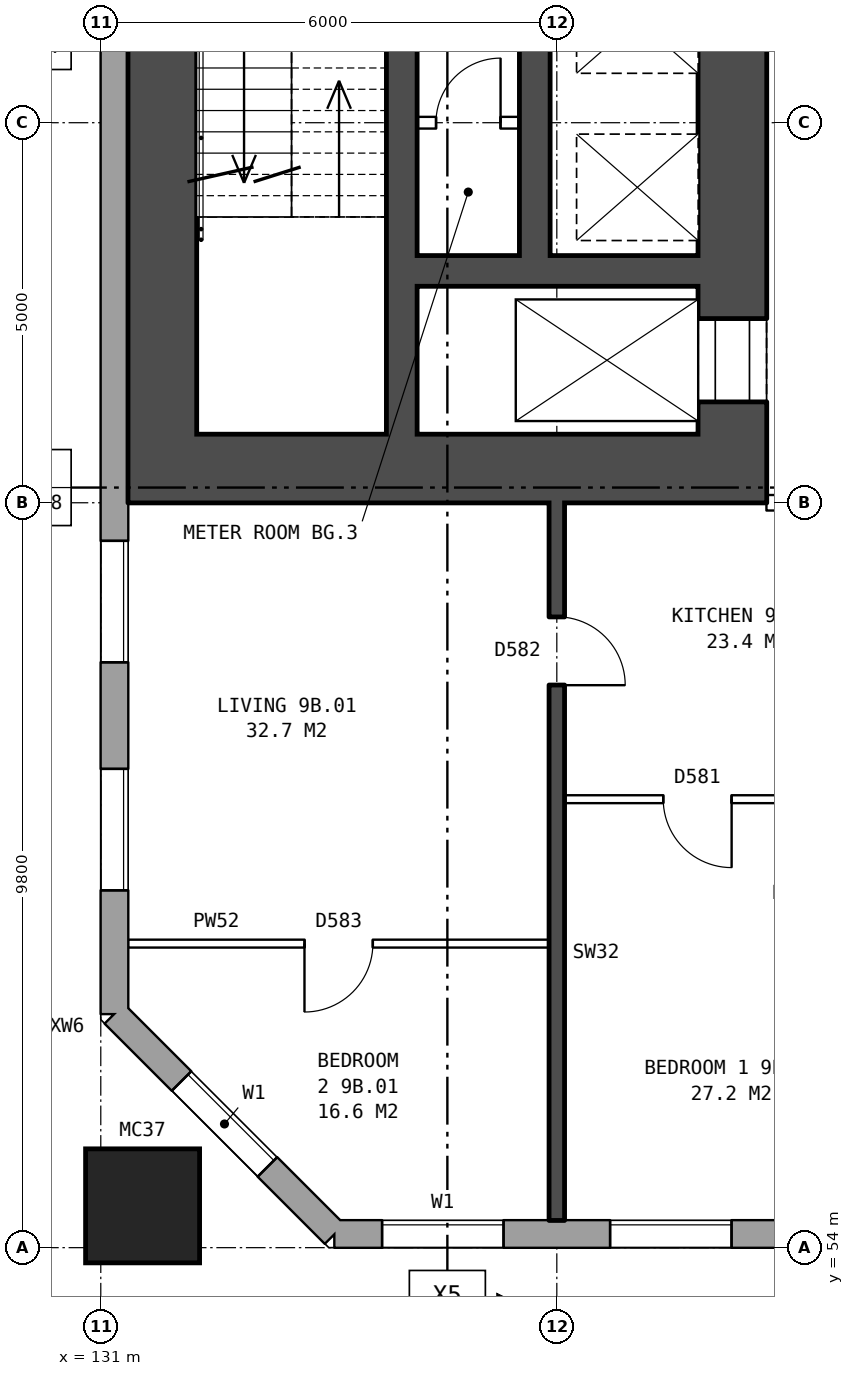
"""IFC4 building model, lengths in metres.
Left out: names, types, materials, properties, quantities, classifications, styles, units other than length and angle.
Written with IfcOpenShell. Run it as: python <this file> out.ifc"""

import sys

from ifc_helpers import new_model, si_unit, direction, frame, frame_2d, origin, origin_2d, place, context, subcontext, project, spatial, rectangle, hollow_rectangle, extrude, element, fill, save


model = new_model("IFC4")
c1 = context("Model", 3, precision=1e-05, world=origin(), true_north=direction((0.0, 1.0)))
c2 = subcontext(c1, "Body", "Model", "MODEL_VIEW")
j1 = project(units=[si_unit("LENGTHUNIT", "METRE"), si_unit("PLANEANGLEUNIT", "RADIAN")], contexts=[c1])
p1 = place(None, origin())
s1 = spatial("IfcSite", under=j1, at=p1, CompositionType="ELEMENT")
p2 = place(p1, origin())
s2 = spatial("IfcBuilding", under=s1, at=p2, CompositionType="ELEMENT")
p3 = place(p2, frame((0.0, 0.0, 35.0)))
s3 = spatial("IfcBuildingStorey", under=s2, at=p3, CompositionType="ELEMENT", Elevation=35.0)
p4 = place(p3, frame((131.55, 54.55, 0.0), z_axis=(0.0, 0.0, 1.0), x_axis=(1.0, 0.0, 0.0)))
e1 = element("IfcColumn", 1, at=p4, inside=s3, PredefinedType="COLUMN", context=c2, shape_type="SweptSolid", body=[
    extrude(hollow_rectangle(XDim=1.5, YDim=1.5, WallThickness=0.08, at=origin_2d()), origin(), (0.0, 0.0, 1.0), 3.1),
])
p5 = place(p3, frame((131.18, 57.075, 0.0), z_axis=(0.0, 0.0, 1.0), x_axis=(0.707106781187, -0.707106781187, 0.0)))
e2 = element("IfcWall", 2, at=p5, inside=s3, PredefinedType="STANDARD", context=c2, shape_type="SweptSolid", body=[
    extrude(rectangle(XDim=4.094, YDim=0.36, at=frame_2d((2.047, 0.0))), origin(), (0.0, 0.0, 1.0), 2.85),
])
p6 = place(p5, frame((1.247, 0.0, 0.8)))
e3 = element("IfcOpeningElement", 3, at=p6, cuts=e2, PredefinedType="OPENING", context=c2, shape_type="SweptSolid", body=[
    extrude(rectangle(XDim=1.6, YDim=1.8, at=frame_2d((0.8, 0.9))), frame((0.0, 0.19, 0.0), z_axis=(0.0, -1.0, 0.0), x_axis=(1.0, 0.0, 0.0)), (0.0, 0.0, 1.0), 0.38),
])
p7 = place(p3, frame((134.075, 54.18, 0.0), z_axis=(0.0, 0.0, 1.0), x_axis=(1.0, 0.0, 0.0)))
e4 = element("IfcWall", 4, at=p7, inside=s3, PredefinedType="STANDARD", context=c2, shape_type="SweptSolid", body=[
    extrude(rectangle(XDim=40.601, YDim=0.36, at=frame_2d((20.3, 0.0))), origin(), (0.0, 0.0, 1.0), 2.85),
])
p8 = place(p7, frame((0.625, 0.0, 0.8)))
e5 = element("IfcOpeningElement", 5, at=p8, cuts=e4, PredefinedType="OPENING", context=c2, shape_type="SweptSolid", body=[
    extrude(rectangle(XDim=1.6, YDim=1.8, at=frame_2d((0.8, 0.9))), frame((0.0, 0.19, 0.0), z_axis=(0.0, -1.0, 0.0), x_axis=(1.0, 0.0, 0.0)), (0.0, 0.0, 1.0), 0.38),
])
p9 = place(p7, frame((3.625, 0.0, 0.8)))
e6 = element("IfcOpeningElement", 6, at=p9, cuts=e4, PredefinedType="OPENING", context=c2, shape_type="SweptSolid", body=[
    extrude(rectangle(XDim=1.6, YDim=1.8, at=frame_2d((0.8, 0.9))), frame((0.0, 0.19, 0.0), z_axis=(0.0, -1.0, 0.0), x_axis=(1.0, 0.0, 0.0)), (0.0, 0.0, 1.0), 0.38),
])
p10 = place(p7, frame((6.625, 0.0, 0.8)))
e7 = element("IfcOpeningElement", 7, at=p10, cuts=e4, PredefinedType="OPENING", context=c2, shape_type="SweptSolid", body=[
    extrude(rectangle(XDim=1.6, YDim=1.8, at=frame_2d((0.8, 0.9))), frame((0.0, 0.19, 0.0), z_axis=(0.0, -1.0, 0.0), x_axis=(1.0, 0.0, 0.0)), (0.0, 0.0, 1.0), 0.38),
])
p11 = place(p7, frame((9.625, 0.0, 0.8)))
e8 = element("IfcOpeningElement", 8, at=p11, cuts=e4, PredefinedType="OPENING", context=c2, shape_type="SweptSolid", body=[
    extrude(rectangle(XDim=1.6, YDim=1.8, at=frame_2d((0.8, 0.9))), frame((0.0, 0.19, 0.0), z_axis=(0.0, -1.0, 0.0), x_axis=(1.0, 0.0, 0.0)), (0.0, 0.0, 1.0), 0.38),
])
p12 = place(p7, frame((12.625, 0.0, 0.8)))
e9 = element("IfcOpeningElement", 9, at=p12, cuts=e4, PredefinedType="OPENING", context=c2, shape_type="SweptSolid", body=[
    extrude(rectangle(XDim=1.6, YDim=1.8, at=frame_2d((0.8, 0.9))), frame((0.0, 0.19, 0.0), z_axis=(0.0, -1.0, 0.0), x_axis=(1.0, 0.0, 0.0)), (0.0, 0.0, 1.0), 0.38),
])
p13 = place(p7, frame((15.625, 0.0, 0.8)))
e10 = element("IfcOpeningElement", 10, at=p13, cuts=e4, PredefinedType="OPENING", context=c2, shape_type="SweptSolid", body=[
    extrude(rectangle(XDim=1.6, YDim=1.8, at=frame_2d((0.8, 0.9))), frame((0.0, 0.19, 0.0), z_axis=(0.0, -1.0, 0.0), x_axis=(1.0, 0.0, 0.0)), (0.0, 0.0, 1.0), 0.38),
])
p14 = place(p7, frame((18.875, 0.0, 0.15)))
e11 = element("IfcOpeningElement", 11, at=p14, cuts=e4, PredefinedType="OPENING", context=c2, shape_type="SweptSolid", body=[
    extrude(rectangle(XDim=0.8, YDim=0.9, at=frame_2d((0.4, 0.45))), frame((0.0, 0.19, 0.0), z_axis=(0.0, -1.0, 0.0), x_axis=(1.0, 0.0, 0.0)), (0.0, 0.0, 1.0), 0.38),
])
p15 = place(p7, frame((22.175, 0.0, 1.7)))
e12 = element("IfcOpeningElement", 12, at=p15, cuts=e4, PredefinedType="OPENING", context=c2, shape_type="SweptSolid", body=[
    extrude(rectangle(XDim=0.8, YDim=0.9, at=frame_2d((0.4, 0.45))), frame((0.0, 0.19, 0.0), z_axis=(0.0, -1.0, 0.0), x_axis=(1.0, 0.0, 0.0)), (0.0, 0.0, 1.0), 0.38),
])
p16 = place(p7, frame((24.625, 0.0, 0.8)))
e13 = element("IfcOpeningElement", 13, at=p16, cuts=e4, PredefinedType="OPENING", context=c2, shape_type="SweptSolid", body=[
    extrude(rectangle(XDim=1.6, YDim=1.8, at=frame_2d((0.8, 0.9))), frame((0.0, 0.19, 0.0), z_axis=(0.0, -1.0, 0.0), x_axis=(1.0, 0.0, 0.0)), (0.0, 0.0, 1.0), 0.38),
])
p17 = place(p7, frame((27.625, 0.0, 0.8)))
e14 = element("IfcOpeningElement", 14, at=p17, cuts=e4, PredefinedType="OPENING", context=c2, shape_type="SweptSolid", body=[
    extrude(rectangle(XDim=1.6, YDim=1.8, at=frame_2d((0.8, 0.9))), frame((0.0, 0.19, 0.0), z_axis=(0.0, -1.0, 0.0), x_axis=(1.0, 0.0, 0.0)), (0.0, 0.0, 1.0), 0.38),
])
p18 = place(p7, frame((30.625, 0.0, 0.8)))
e15 = element("IfcOpeningElement", 15, at=p18, cuts=e4, PredefinedType="OPENING", context=c2, shape_type="SweptSolid", body=[
    extrude(rectangle(XDim=1.6, YDim=1.8, at=frame_2d((0.8, 0.9))), frame((0.0, 0.19, 0.0), z_axis=(0.0, -1.0, 0.0), x_axis=(1.0, 0.0, 0.0)), (0.0, 0.0, 1.0), 0.38),
])
p19 = place(p7, frame((33.625, 0.0, 0.8)))
e16 = element("IfcOpeningElement", 16, at=p19, cuts=e4, PredefinedType="OPENING", context=c2, shape_type="SweptSolid", body=[
    extrude(rectangle(XDim=1.6, YDim=1.8, at=frame_2d((0.8, 0.9))), frame((0.0, 0.19, 0.0), z_axis=(0.0, -1.0, 0.0), x_axis=(1.0, 0.0, 0.0)), (0.0, 0.0, 1.0), 0.38),
])
p20 = place(p7, frame((36.625, 0.0, 0.8)))
e17 = element("IfcOpeningElement", 17, at=p20, cuts=e4, PredefinedType="OPENING", context=c2, shape_type="SweptSolid", body=[
    extrude(rectangle(XDim=1.6, YDim=1.8, at=frame_2d((0.8, 0.9))), frame((0.0, 0.19, 0.0), z_axis=(0.0, -1.0, 0.0), x_axis=(1.0, 0.0, 0.0)), (0.0, 0.0, 1.0), 0.38),
])
p21 = place(p7, frame((19.975, 0.0, 0.15)))
e18 = element("IfcOpeningElement", 18, at=p21, cuts=e4, PredefinedType="OPENING", context=c2, shape_type="SweptSolid", body=[
    extrude(rectangle(XDim=0.6, YDim=1.8, at=frame_2d((0.3, 0.9))), frame((0.0, 0.19, 0.0), z_axis=(0.0, -1.0, 0.0), x_axis=(1.0, 0.0, 0.0)), (0.0, 0.0, 1.0), 0.38),
])
p22 = place(p7, frame((23.325, 0.0, 0.8)))
e19 = element("IfcOpeningElement", 19, at=p22, cuts=e4, PredefinedType="OPENING", context=c2, shape_type="SweptSolid", body=[
    extrude(rectangle(XDim=1.0, YDim=1.8, at=frame_2d((0.5, 0.9))), frame((0.0, 0.19, 0.0), z_axis=(0.0, -1.0, 0.0), x_axis=(1.0, 0.0, 0.0)), (0.0, 0.0, 1.0), 0.38),
])
p23 = place(p3, frame((131.18, 82.925, 0.0), z_axis=(0.0, 0.0, 1.0), x_axis=(0.0, -1.0, 0.0)))
e20 = element("IfcWall", 20, at=p23, inside=s3, PredefinedType="STANDARD", context=c2, shape_type="SweptSolid", body=[
    extrude(rectangle(XDim=25.851, YDim=0.36, at=frame_2d((12.925, 0.0))), origin(), (0.0, 0.0, 1.0), 2.85),
])
p24 = place(p23, frame((1.625, 0.0, 0.8)))
e21 = element("IfcOpeningElement", 21, at=p24, cuts=e20, PredefinedType="OPENING", context=c2, shape_type="SweptSolid", body=[
    extrude(rectangle(XDim=1.6, YDim=1.8, at=frame_2d((0.8, 0.9))), frame((0.0, 0.19, 0.0), z_axis=(0.0, -1.0, 0.0), x_axis=(1.0, 0.0, 0.0)), (0.0, 0.0, 1.0), 0.38),
])
p25 = place(p23, frame((4.625, 0.0, 0.8)))
e22 = element("IfcOpeningElement", 22, at=p25, cuts=e20, PredefinedType="OPENING", context=c2, shape_type="SweptSolid", body=[
    extrude(rectangle(XDim=1.6, YDim=1.8, at=frame_2d((0.8, 0.9))), frame((0.0, 0.19, 0.0), z_axis=(0.0, -1.0, 0.0), x_axis=(1.0, 0.0, 0.0)), (0.0, 0.0, 1.0), 0.38),
])
p26 = place(p23, frame((19.625, 0.0, 0.8)))
e23 = element("IfcOpeningElement", 23, at=p26, cuts=e20, PredefinedType="OPENING", context=c2, shape_type="SweptSolid", body=[
    extrude(rectangle(XDim=1.6, YDim=1.8, at=frame_2d((0.8, 0.9))), frame((0.0, 0.19, 0.0), z_axis=(0.0, -1.0, 0.0), x_axis=(1.0, 0.0, 0.0)), (0.0, 0.0, 1.0), 0.38),
])
p27 = place(p23, frame((22.625, 0.0, 0.8)))
e24 = element("IfcOpeningElement", 24, at=p27, cuts=e20, PredefinedType="OPENING", context=c2, shape_type="SweptSolid", body=[
    extrude(rectangle(XDim=1.6, YDim=1.8, at=frame_2d((0.8, 0.9))), frame((0.0, 0.19, 0.0), z_axis=(0.0, -1.0, 0.0), x_axis=(1.0, 0.0, 0.0)), (0.0, 0.0, 1.0), 0.38),
])
p28 = place(p3, frame((139.31, 64.7, 0.0), z_axis=(0.0, 0.0, 1.0), x_axis=(0.0, 1.0, 0.0)))
e25 = element("IfcWall", 25, at=p28, inside=s3, PredefinedType="SHEAR", context=c2, shape_type="SweptSolid", body=[
    extrude(rectangle(XDim=10.6, YDim=0.9, at=frame_2d((5.3, 0.0))), origin(), (0.0, 0.0, 1.0), 2.85),
])
p29 = place(p28, frame((0.425, 0.0, 0.0)))
e26 = element("IfcOpeningElement", 26, at=p29, cuts=e25, PredefinedType="OPENING", context=c2, shape_type="SweptSolid", body=[
    extrude(rectangle(XDim=1.1, YDim=2.1, at=frame_2d((0.55, 1.05))), frame((0.0, 0.46, 0.0), z_axis=(0.0, -1.0, 0.0), x_axis=(1.0, 0.0, 0.0)), (0.0, 0.0, 1.0), 0.92),
])
p30 = place(p28, frame((9.0, 0.0, 0.0)))
e27 = element("IfcOpeningElement", 27, at=p30, cuts=e25, PredefinedType="OPENING", context=c2, shape_type="SweptSolid", body=[
    extrude(rectangle(XDim=1.1, YDim=2.1, at=frame_2d((0.55, 1.05))), frame((0.0, 0.46, 0.0), z_axis=(0.0, -1.0, 0.0), x_axis=(1.0, 0.0, 0.0)), (0.0, 0.0, 1.0), 0.92),
])
p31 = place(p28, frame((7.225, 0.0, 0.0)))
e28 = element("IfcOpeningElement", 28, at=p31, cuts=e25, PredefinedType="OPENING", context=c2, shape_type="SweptSolid", body=[
    extrude(rectangle(XDim=0.85, YDim=2.1, at=frame_2d((0.425, 1.05))), frame((0.0, 0.46, 0.0), z_axis=(0.0, -1.0, 0.0), x_axis=(1.0, 0.0, 0.0)), (0.0, 0.0, 1.0), 0.92),
])
p32 = place(p3, frame((131.81, 64.7, 0.0), z_axis=(0.0, 0.0, 1.0), x_axis=(0.0, 1.0, 0.0)))
e29 = element("IfcWall", 29, at=p32, inside=s3, PredefinedType="SHEAR", context=c2, shape_type="SweptSolid", body=[
    extrude(rectangle(XDim=10.6, YDim=0.9, at=frame_2d((5.3, 0.0))), origin(), (0.0, 0.0, 1.0), 2.85),
])
p33 = place(p3, frame((139.76, 64.25, 0.0), z_axis=(0.0, 0.0, 1.0), x_axis=(-1.0, 0.0, 0.0)))
e30 = element("IfcWall", 30, at=p33, inside=s3, PredefinedType="SHEAR", context=c2, shape_type="SweptSolid", body=[
    extrude(rectangle(XDim=8.4, YDim=0.9, at=frame_2d((4.2, 0.0))), origin(), (0.0, 0.0, 1.0), 2.85),
])
p34 = place(p3, frame((138.86, 66.85, 0.0), z_axis=(0.0, 0.0, 1.0), x_axis=(-1.0, 0.0, 0.0)))
e31 = element("IfcWall", 31, at=p34, inside=s3, PredefinedType="SHEAR", context=c2, shape_type="SweptSolid", body=[
    extrude(rectangle(XDim=3.7, YDim=0.4, at=frame_2d((1.85, 0.0))), origin(), (0.0, 0.0, 1.0), 2.85),
])
p35 = place(p3, frame((136.51, 68.8, 0.0), z_axis=(0.0, 0.0, 1.0), x_axis=(-1.0, 0.0, 0.0)))
e32 = element("IfcWall", 32, at=p35, inside=s3, PredefinedType="PARTITIONING", context=c2, shape_type="SweptSolid", body=[
    extrude(rectangle(XDim=1.35, YDim=0.15, at=frame_2d((0.675, 0.0))), origin(), (0.0, 0.0, 1.0), 2.85),
])
p36 = place(p35, frame((0.25, 0.0, 0.0)))
e33 = element("IfcOpeningElement", 33, at=p36, cuts=e32, PredefinedType="OPENING", context=c2, shape_type="SweptSolid", body=[
    extrude(rectangle(XDim=0.85, YDim=2.1, at=frame_2d((0.425, 1.05))), frame((0.0, 0.085, 0.0), z_axis=(0.0, -1.0, 0.0), x_axis=(1.0, 0.0, 0.0)), (0.0, 0.0, 1.0), 0.17),
])
p37 = place(p3, frame((136.71, 67.05, 0.0), z_axis=(0.0, 0.0, 1.0), x_axis=(0.0, 1.0, 0.0)))
e34 = element("IfcWall", 34, at=p37, inside=s3, PredefinedType="SHEAR", context=c2, shape_type="SweptSolid", body=[
    extrude(rectangle(XDim=4.0, YDim=0.4, at=frame_2d((2.0, 0.0))), origin(), (0.0, 0.0, 1.0), 2.85),
])
p38 = place(p3, frame((134.96, 64.7, 0.0), z_axis=(0.0, 0.0, 1.0), x_axis=(0.0, 1.0, 0.0)))
e35 = element("IfcWall", 35, at=p38, inside=s3, PredefinedType="SHEAR", context=c2, shape_type="SweptSolid", body=[
    extrude(rectangle(XDim=6.35, YDim=0.4, at=frame_2d((3.175, 0.0))), origin(), (0.0, 0.0, 1.0), 2.85),
])
p39 = place(p3, frame((131.36, 58.0, 0.0), z_axis=(0.0, 0.0, 1.0), x_axis=(1.0, 0.0, 0.0)))
e36 = element("IfcWall", 36, at=p39, inside=s3, PredefinedType="PARTITIONING", context=c2, shape_type="SweptSolid", body=[
    extrude(rectangle(XDim=5.54, YDim=0.1, at=frame_2d((2.77, 0.0))), origin(), (0.0, 0.0, 1.0), 2.85),
])
p40 = place(p39, frame((2.32, 0.0, 0.0)))
e37 = element("IfcOpeningElement", 37, at=p40, cuts=e36, PredefinedType="OPENING", context=c2, shape_type="SweptSolid", body=[
    extrude(rectangle(XDim=0.9, YDim=2.1, at=frame_2d((0.45, 1.05))), frame((0.0, 0.06, 0.0), z_axis=(0.0, -1.0, 0.0), x_axis=(1.0, 0.0, 0.0)), (0.0, 0.0, 1.0), 0.12),
])
p41 = place(p3, frame((137.1, 59.9, 0.0), z_axis=(0.0, 0.0, 1.0), x_axis=(1.0, 0.0, 0.0)))
e38 = element("IfcWall", 38, at=p41, inside=s3, PredefinedType="PARTITIONING", context=c2, shape_type="SweptSolid", body=[
    extrude(rectangle(XDim=5.8, YDim=0.1, at=frame_2d((2.9, 0.0))), origin(), (0.0, 0.0, 1.0), 2.85),
])
p42 = place(p41, frame((1.3, 0.0, 0.0)))
e39 = element("IfcOpeningElement", 39, at=p42, cuts=e38, PredefinedType="OPENING", context=c2, shape_type="SweptSolid", body=[
    extrude(rectangle(XDim=0.9, YDim=2.1, at=frame_2d((0.45, 1.05))), frame((0.0, 0.06, 0.0), z_axis=(0.0, -1.0, 0.0), x_axis=(1.0, 0.0, 0.0)), (0.0, 0.0, 1.0), 0.12),
])
p43 = place(p41, frame((4.2, 0.0, 0.0)))
e40 = element("IfcOpeningElement", 40, at=p43, cuts=e38, PredefinedType="OPENING", context=c2, shape_type="SweptSolid", body=[
    extrude(rectangle(XDim=0.9, YDim=2.1, at=frame_2d((0.45, 1.05))), frame((0.0, 0.06, 0.0), z_axis=(0.0, -1.0, 0.0), x_axis=(1.0, 0.0, 0.0)), (0.0, 0.0, 1.0), 0.12),
])
p44 = place(p3, frame((139.76, 63.8, 0.0), z_axis=(0.0, 0.0, 1.0), x_axis=(1.0, 0.0, 0.0)))
e41 = element("IfcWall", 41, at=p44, inside=s3, PredefinedType="PARTITIONING", context=c2, shape_type="SweptSolid", body=[
    extrude(rectangle(XDim=3.0, YDim=0.2, at=frame_2d((1.5, 0.0))), origin(), (0.0, 0.0, 1.0), 2.85),
])
p45 = place(p44, frame((1.0, 0.0, 0.0)))
e42 = element("IfcOpeningElement", 42, at=p45, cuts=e41, PredefinedType="OPENING", context=c2, shape_type="SweptSolid", body=[
    extrude(rectangle(XDim=1.0, YDim=2.1, at=frame_2d((0.5, 1.05))), frame((0.0, 0.11, 0.0), z_axis=(0.0, -1.0, 0.0), x_axis=(1.0, 0.0, 0.0)), (0.0, 0.0, 1.0), 0.22),
])
p46 = place(p3, frame((137.0, 54.36, 0.0), z_axis=(0.0, 0.0, 1.0), x_axis=(0.0, 1.0, 0.0)))
e43 = element("IfcWall", 43, at=p46, inside=s3, PredefinedType="SOLIDWALL", context=c2, shape_type="SweptSolid", body=[
    extrude(rectangle(XDim=9.44, YDim=0.2, at=frame_2d((4.72, 0.0))), origin(), (0.0, 0.0, 1.0), 2.85),
])
p47 = place(p46, frame((7.04, 0.0, 0.0)))
e44 = element("IfcOpeningElement", 44, at=p47, cuts=e43, PredefinedType="OPENING", context=c2, shape_type="SweptSolid", body=[
    extrude(rectangle(XDim=0.9, YDim=2.1, at=frame_2d((0.45, 1.05))), frame((0.0, 0.11, 0.0), z_axis=(0.0, -1.0, 0.0), x_axis=(1.0, 0.0, 0.0)), (0.0, 0.0, 1.0), 0.22),
])
p48 = place(p6, origin())
e45 = element("IfcWindow", 45, at=p48, inside=s3, PartitioningType="SINGLE_PANEL", PredefinedType="WINDOW", context=c2, shape_type="SweptSolid", body=[
    extrude(rectangle(XDim=1.6, YDim=1.8, at=frame_2d((0.8, 0.9))), frame((0.0, 0.15, 0.0), z_axis=(0.0, -1.0, 0.0), x_axis=(1.0, 0.0, 0.0)), (0.0, 0.0, 1.0), 0.06),
])
fill(e3, e45)
p49 = place(p8, origin())
e46 = element("IfcWindow", 46, at=p49, inside=s3, PartitioningType="SINGLE_PANEL", PredefinedType="WINDOW", context=c2, shape_type="SweptSolid", body=[
    extrude(rectangle(XDim=1.6, YDim=1.8, at=frame_2d((0.8, 0.9))), frame((0.0, 0.15, 0.0), z_axis=(0.0, -1.0, 0.0), x_axis=(1.0, 0.0, 0.0)), (0.0, 0.0, 1.0), 0.06),
])
fill(e5, e46)
p50 = place(p9, origin())
e47 = element("IfcWindow", 47, at=p50, inside=s3, PartitioningType="SINGLE_PANEL", PredefinedType="WINDOW", context=c2, shape_type="SweptSolid", body=[
    extrude(rectangle(XDim=1.6, YDim=1.8, at=frame_2d((0.8, 0.9))), frame((0.0, 0.15, 0.0), z_axis=(0.0, -1.0, 0.0), x_axis=(1.0, 0.0, 0.0)), (0.0, 0.0, 1.0), 0.06),
])
fill(e6, e47)
p51 = place(p26, origin())
e48 = element("IfcWindow", 48, at=p51, inside=s3, PartitioningType="SINGLE_PANEL", PredefinedType="WINDOW", context=c2, shape_type="SweptSolid", body=[
    extrude(rectangle(XDim=1.6, YDim=1.8, at=frame_2d((0.8, 0.9))), frame((0.0, 0.15, 0.0), z_axis=(0.0, -1.0, 0.0), x_axis=(1.0, 0.0, 0.0)), (0.0, 0.0, 1.0), 0.06),
])
fill(e23, e48)
p52 = place(p27, origin())
e49 = element("IfcWindow", 49, at=p52, inside=s3, PartitioningType="SINGLE_PANEL", PredefinedType="WINDOW", context=c2, shape_type="SweptSolid", body=[
    extrude(rectangle(XDim=1.6, YDim=1.8, at=frame_2d((0.8, 0.9))), frame((0.0, 0.15, 0.0), z_axis=(0.0, -1.0, 0.0), x_axis=(1.0, 0.0, 0.0)), (0.0, 0.0, 1.0), 0.06),
])
fill(e24, e49)
p53 = place(p29, origin())
e50 = element("IfcDoor", 50, at=p53, inside=s3, OperationType="DOUBLE_DOOR_SLIDING", PredefinedType="DOOR", context=c2, shape_type="SweptSolid", body=[
    extrude(rectangle(XDim=1.1, YDim=2.1, at=frame_2d((0.55, 1.05))), frame((0.0, 0.435, 0.0), z_axis=(0.0, -1.0, 0.0), x_axis=(1.0, 0.0, 0.0)), (0.0, 0.0, 1.0), 0.05),
])
fill(e26, e50)
p54 = place(p36, frame((0.85, 0.0, 0.0), z_axis=(0.0, 0.0, 1.0), x_axis=(-1.0, 0.0, 0.0)))
e51 = element("IfcDoor", 51, at=p54, inside=s3, OperationType="SINGLE_SWING_RIGHT", PredefinedType="DOOR", context=c2, shape_type="SweptSolid", body=[
    extrude(rectangle(XDim=0.85, YDim=2.1, at=frame_2d((0.425, 1.05))), frame((0.0, 0.025, 0.0), z_axis=(0.0, -1.0, 0.0), x_axis=(1.0, 0.0, 0.0)), (0.0, 0.0, 1.0), 0.05),
])
fill(e33, e51)
p55 = place(p42, frame((0.9, 0.0, 0.0), z_axis=(0.0, 0.0, 1.0), x_axis=(-1.0, 0.0, 0.0)))
e52 = element("IfcDoor", 52, at=p55, inside=s3, OperationType="SINGLE_SWING_LEFT", PredefinedType="DOOR", context=c2, shape_type="SweptSolid", body=[
    extrude(rectangle(XDim=0.9, YDim=2.1, at=frame_2d((0.45, 1.05))), frame((0.0, 0.025, 0.0), z_axis=(0.0, -1.0, 0.0), x_axis=(1.0, 0.0, 0.0)), (0.0, 0.0, 1.0), 0.05),
])
fill(e39, e52)
p56 = place(p40, frame((0.9, 0.0, 0.0), z_axis=(0.0, 0.0, 1.0), x_axis=(-1.0, 0.0, 0.0)))
e53 = element("IfcDoor", 53, at=p56, inside=s3, OperationType="SINGLE_SWING_RIGHT", PredefinedType="DOOR", context=c2, shape_type="SweptSolid", body=[
    extrude(rectangle(XDim=0.9, YDim=2.1, at=frame_2d((0.45, 1.05))), frame((0.0, 0.025, 0.0), z_axis=(0.0, -1.0, 0.0), x_axis=(1.0, 0.0, 0.0)), (0.0, 0.0, 1.0), 0.05),
])
fill(e37, e53)
p57 = place(p47, frame((0.9, 0.0, 0.0), z_axis=(0.0, 0.0, 1.0), x_axis=(-1.0, 0.0, 0.0)))
e54 = element("IfcDoor", 54, at=p57, inside=s3, OperationType="SINGLE_SWING_RIGHT", PredefinedType="DOOR", context=c2, shape_type="SweptSolid", body=[
    extrude(rectangle(XDim=0.9, YDim=2.1, at=frame_2d((0.45, 1.05))), frame((0.0, 0.025, 0.0), z_axis=(0.0, -1.0, 0.0), x_axis=(1.0, 0.0, 0.0)), (0.0, 0.0, 1.0), 0.05),
])
fill(e44, e54)
save(model, sys.argv[1])
